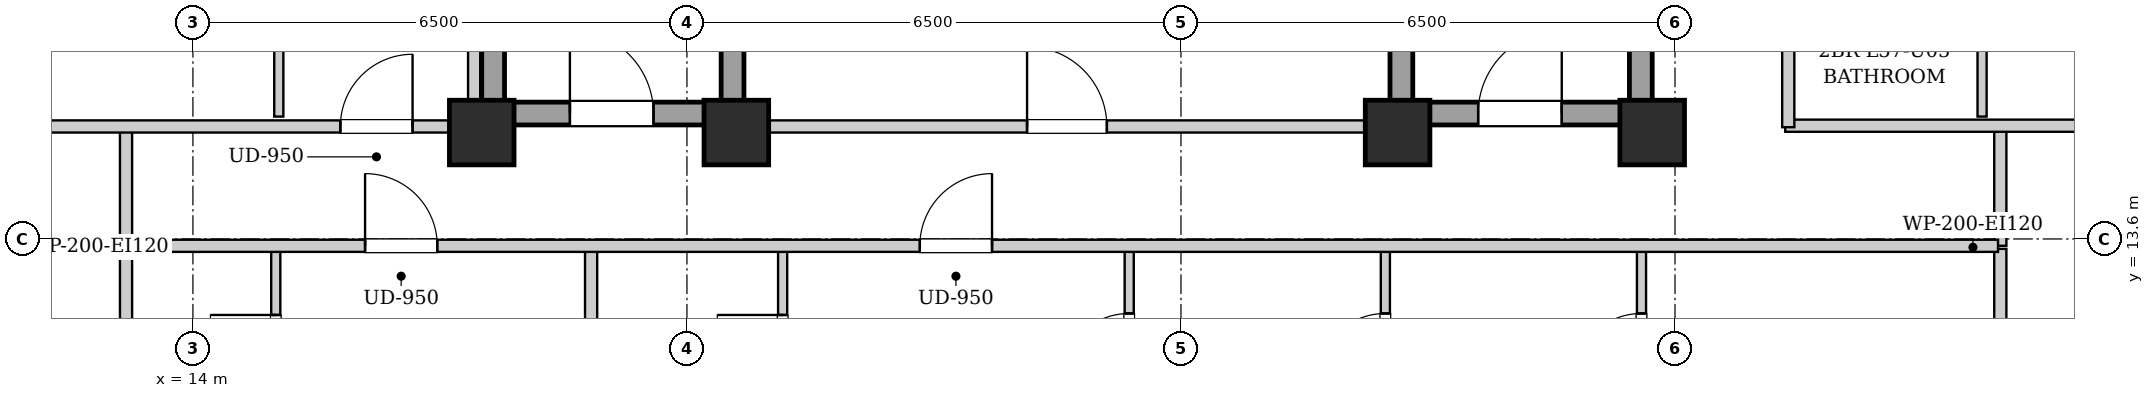
"""IFC4 building model, lengths in metres.
Left out: names, types, materials, properties, quantities, classifications, styles, units other than length and angle.
Written with IfcOpenShell. Run it as: python <this file> out.ifc"""

import sys

from ifc_helpers import new_model, si_unit, direction, frame, frame_2d, origin, origin_2d, place, context, subcontext, project, spatial, rectangle, extrude, element, fill, save


model = new_model("IFC4")
c1 = context("Model", 3, precision=1e-05, world=origin(), true_north=direction((0.0, 1.0)))
c2 = subcontext(c1, "Body", "Model", "MODEL_VIEW")
j1 = project(units=[si_unit("LENGTHUNIT", "METRE"), si_unit("PLANEANGLEUNIT", "RADIAN")], contexts=[c1])
p1 = place(None, origin())
s1 = spatial("IfcSite", under=j1, at=p1, CompositionType="ELEMENT")
p2 = place(p1, origin())
s2 = spatial("IfcBuilding", under=s1, at=p2, CompositionType="ELEMENT")
p3 = place(p2, frame((0.0, 0.0, 197.5)))
s3 = spatial("IfcBuildingStorey", under=s2, at=p3, CompositionType="ELEMENT", Elevation=197.5)
for number, where, z_axis, x_axis in (
    (1, (17.8, 15.0, 0.0), (0.0, 0.0, 1.0), (1.0, 0.0, 0.0)),
    (2, (21.15, 15.0, 0.0), (0.0, 0.0, 1.0), (1.0, 0.0, 0.0)),
    (3, (29.85, 15.0, 0.0), (0.0, 0.0, 1.0), (1.0, 0.0, 0.0)),
    (4, (33.2, 15.0, 0.0), (0.0, 0.0, 1.0), (1.0, 0.0, 0.0)),
):
    element("IfcColumn", number, at=place(p3, frame(where, z_axis=z_axis, x_axis=x_axis)), inside=s3, PredefinedType="COLUMN", context=c2, shape_type="SweptSolid", body=[
        extrude(rectangle(XDim=0.85, YDim=0.85, at=origin_2d()), origin(), (0.0, 0.0, 1.0), 3.3),
    ])
for number, where, z_axis, x_axis in (
    (5, (17.95, 15.1, 0.0), (0.0, 0.0, 1.0), (0.0, 1.0, 0.0)),
    (6, (21.1, 15.1, 0.0), (0.0, 0.0, 1.0), (0.0, 1.0, 0.0)),
):
    element("IfcWall", number, at=place(p3, frame(where, z_axis=z_axis, x_axis=x_axis)), inside=s3, PredefinedType="SHEAR", context=c2, shape_type="SweptSolid", body=[
        extrude(rectangle(XDim=9.0, YDim=0.3, at=frame_2d((4.5, 0.0))), origin(), (0.0, 0.0, 1.0), 3.04),
    ])
p4 = place(p3, frame((18.1, 15.25, 0.0), z_axis=(0.0, 0.0, 1.0), x_axis=(1.0, 0.0, 0.0)))
e7 = element("IfcWall", 7, at=p4, inside=s3, PredefinedType="SHEAR", context=c2, shape_type="SweptSolid", body=[
    extrude(rectangle(XDim=2.85, YDim=0.3, at=frame_2d((1.425, 0.0))), origin(), (0.0, 0.0, 1.0), 3.04),
])
p5 = place(p4, frame((0.86, 0.0, 0.0)))
e8 = element("IfcOpeningElement", 8, at=p5, cuts=e7, PredefinedType="OPENING", context=c2, shape_type="SweptSolid", body=[
    extrude(rectangle(XDim=1.1, YDim=2.05, at=frame_2d((0.55, 1.025))), frame((0.0, 0.16, 0.0), z_axis=(0.0, -1.0, 0.0), x_axis=(1.0, 0.0, 0.0)), (0.0, 0.0, 1.0), 0.32),
])
for number, where, z_axis, x_axis in (
    (9, (29.9, 15.1, 0.0), (0.0, 0.0, 1.0), (0.0, 1.0, 0.0)),
    (10, (33.05, 15.1, 0.0), (0.0, 0.0, 1.0), (0.0, 1.0, 0.0)),
):
    element("IfcWall", number, at=place(p3, frame(where, z_axis=z_axis, x_axis=x_axis)), inside=s3, PredefinedType="SHEAR", context=c2, shape_type="SweptSolid", body=[
        extrude(rectangle(XDim=9.0, YDim=0.3, at=frame_2d((4.5, 0.0))), origin(), (0.0, 0.0, 1.0), 3.04),
    ])
p6 = place(p3, frame((30.05, 15.25, 0.0), z_axis=(0.0, 0.0, 1.0), x_axis=(1.0, 0.0, 0.0)))
e11 = element("IfcWall", 11, at=p6, inside=s3, PredefinedType="SHEAR", context=c2, shape_type="SweptSolid", body=[
    extrude(rectangle(XDim=2.85, YDim=0.3, at=frame_2d((1.425, 0.0))), origin(), (0.0, 0.0, 1.0), 3.04),
])
p7 = place(p6, frame((0.86, 0.0, 0.0)))
e12 = element("IfcOpeningElement", 12, at=p7, cuts=e11, PredefinedType="OPENING", context=c2, shape_type="SweptSolid", body=[
    extrude(rectangle(XDim=1.1, YDim=2.05, at=frame_2d((0.55, 1.025))), frame((0.0, 0.16, 0.0), z_axis=(0.0, -1.0, 0.0), x_axis=(1.0, 0.0, 0.0)), (0.0, 0.0, 1.0), 0.32),
])
p8 = place(p3, frame((21.25, 15.08, 0.0), z_axis=(0.0, 0.0, 1.0), x_axis=(1.0, 0.0, 0.0)))
e13 = element("IfcWall", 13, at=p8, inside=s3, PredefinedType="PARTITIONING", context=c2, shape_type="SweptSolid", body=[
    extrude(rectangle(XDim=8.5, YDim=0.16, at=frame_2d((4.25, 0.0))), origin(), (0.0, 0.0, 1.0), 2.556),
])
p9 = place(p8, frame((3.725, 0.0, 0.0)))
e14 = element("IfcOpeningElement", 14, at=p9, cuts=e13, PredefinedType="OPENING", context=c2, shape_type="SweptSolid", body=[
    extrude(rectangle(XDim=1.05, YDim=2.05, at=frame_2d((0.525, 1.025))), frame((0.0, 0.09, 0.0), z_axis=(0.0, -1.0, 0.0), x_axis=(1.0, 0.0, 0.0)), (0.0, 0.0, 1.0), 0.18),
])
for number, where, z_axis, x_axis in (
    (15, (13.12, 13.51, 0.0), (0.0, 0.0, 1.0), (0.0, 1.0, 0.0)),
    (16, (37.78, 13.51, 0.0), (0.0, 0.0, 1.0), (0.0, 1.0, 0.0)),
):
    element("IfcWall", number, at=place(p3, frame(where, z_axis=z_axis, x_axis=x_axis)), inside=s3, PredefinedType="PARTITIONING", context=c2, shape_type="SweptSolid", body=[
        extrude(rectangle(XDim=1.58, YDim=0.16, at=frame_2d((0.79, 0.0))), origin(), (0.0, 0.0, 1.0), 3.04),
    ])
p10 = place(p3, frame((34.95, 15.09, 0.0), z_axis=(0.0, 0.0, 1.0), x_axis=(1.0, 0.0, 0.0)))
e17 = element("IfcWall", 17, at=p10, inside=s3, PredefinedType="PARTITIONING", context=c2, shape_type="SweptSolid", body=[
    extrude(rectangle(XDim=5.07, YDim=0.16, at=frame_2d((2.535, 0.0))), origin(), (0.0, 0.0, 1.0), 2.556),
])
p11 = place(p3, frame((13.12, 10.81, 0.0), z_axis=(0.0, 0.0, 1.0), x_axis=(0.0, 1.0, 0.0)))
e18 = element("IfcWall", 18, at=p11, inside=s3, PredefinedType="PARTITIONING", context=c2, shape_type="SweptSolid", body=[
    extrude(rectangle(XDim=2.66, YDim=0.16, at=frame_2d((1.33, 0.0))), origin(), (0.0, 0.0, 1.0), 3.04),
])
p12 = place(p3, frame((15.09, 10.87, 0.0), z_axis=(0.0, 0.0, 1.0), x_axis=(0.0, 1.0, 0.0)))
e19 = element("IfcWall", 19, at=p12, inside=s3, PredefinedType="PARTITIONING", context=c2, shape_type="SweptSolid", body=[
    extrude(rectangle(XDim=2.6, YDim=0.12, at=frame_2d((1.3, 0.0))), origin(), (0.0, 0.0, 1.0), 3.04),
])
p13 = place(p12, frame((0.87, 0.0, 0.0)))
e20 = element("IfcOpeningElement", 20, at=p13, cuts=e19, PredefinedType="OPENING", context=c2, shape_type="SweptSolid", body=[
    extrude(rectangle(XDim=0.86, YDim=2.05, at=frame_2d((0.43, 1.025))), frame((0.0, 0.07, 0.0), z_axis=(0.0, -1.0, 0.0), x_axis=(1.0, 0.0, 0.0)), (0.0, 0.0, 1.0), 0.14),
])
p14 = place(p3, frame((37.78, 10.81, 0.0), z_axis=(0.0, 0.0, 1.0), x_axis=(0.0, 1.0, 0.0)))
e21 = element("IfcWall", 21, at=p14, inside=s3, PredefinedType="PARTITIONING", context=c2, shape_type="SweptSolid", body=[
    extrude(rectangle(XDim=2.66, YDim=0.16, at=frame_2d((1.33, 0.0))), origin(), (0.0, 0.0, 1.0), 3.04),
])
p15 = place(p3, frame((19.239, 6.06, 0.0), z_axis=(0.0, 0.0, 1.0), x_axis=(0.0, 1.0, 0.0)))
e22 = element("IfcWall", 22, at=p15, inside=s3, PredefinedType="PARTITIONING", context=c2, shape_type="SweptSolid", body=[
    extrude(rectangle(XDim=7.41, YDim=0.16, at=frame_2d((3.705, 0.0))), origin(), (0.0, 0.0, 1.0), 3.04),
])
p16 = place(p3, frame((21.759, 10.87, 0.0), z_axis=(0.0, 0.0, 1.0), x_axis=(0.0, 1.0, 0.0)))
e23 = element("IfcWall", 23, at=p16, inside=s3, PredefinedType="PARTITIONING", context=c2, shape_type="SweptSolid", body=[
    extrude(rectangle(XDim=2.6, YDim=0.12, at=frame_2d((1.3, 0.0))), origin(), (0.0, 0.0, 1.0), 3.04),
])
p17 = place(p16, frame((0.87, 0.0, 0.0)))
e24 = element("IfcOpeningElement", 24, at=p17, cuts=e23, PredefinedType="OPENING", context=c2, shape_type="SweptSolid", body=[
    extrude(rectangle(XDim=0.86, YDim=2.05, at=frame_2d((0.43, 1.025))), frame((0.0, 0.07, 0.0), z_axis=(0.0, -1.0, 0.0), x_axis=(1.0, 0.0, 0.0)), (0.0, 0.0, 1.0), 0.14),
])
p18 = place(p3, frame((26.319, 10.87, 0.0), z_axis=(0.0, 0.0, 1.0), x_axis=(0.0, 1.0, 0.0)))
e25 = element("IfcWall", 25, at=p18, inside=s3, PredefinedType="PARTITIONING", context=c2, shape_type="SweptSolid", body=[
    extrude(rectangle(XDim=2.6, YDim=0.12, at=frame_2d((1.3, 0.0))), origin(), (0.0, 0.0, 1.0), 3.04),
])
p19 = place(p18, frame((0.85, 0.0, 0.0)))
e26 = element("IfcOpeningElement", 26, at=p19, cuts=e25, PredefinedType="OPENING", context=c2, shape_type="SweptSolid", body=[
    extrude(rectangle(XDim=0.9, YDim=2.05, at=frame_2d((0.45, 1.025))), frame((0.0, 0.07, 0.0), z_axis=(0.0, -1.0, 0.0), x_axis=(1.0, 0.0, 0.0)), (0.0, 0.0, 1.0), 0.14),
])
p20 = place(p3, frame((29.689, 10.87, 0.0), z_axis=(0.0, 0.0, 1.0), x_axis=(0.0, 1.0, 0.0)))
e27 = element("IfcWall", 27, at=p20, inside=s3, PredefinedType="PARTITIONING", context=c2, shape_type="SweptSolid", body=[
    extrude(rectangle(XDim=2.6, YDim=0.12, at=frame_2d((1.3, 0.0))), origin(), (0.0, 0.0, 1.0), 3.04),
])
p21 = place(p20, frame((0.85, 0.0, 0.0)))
e28 = element("IfcOpeningElement", 28, at=p21, cuts=e27, PredefinedType="OPENING", context=c2, shape_type="SweptSolid", body=[
    extrude(rectangle(XDim=0.9, YDim=2.05, at=frame_2d((0.45, 1.025))), frame((0.0, 0.07, 0.0), z_axis=(0.0, -1.0, 0.0), x_axis=(1.0, 0.0, 0.0)), (0.0, 0.0, 1.0), 0.14),
])
p22 = place(p3, frame((33.059, 10.87, 0.0), z_axis=(0.0, 0.0, 1.0), x_axis=(0.0, 1.0, 0.0)))
e29 = element("IfcWall", 29, at=p22, inside=s3, PredefinedType="PARTITIONING", context=c2, shape_type="SweptSolid", body=[
    extrude(rectangle(XDim=2.6, YDim=0.12, at=frame_2d((1.3, 0.0))), origin(), (0.0, 0.0, 1.0), 3.04),
])
p23 = place(p22, frame((0.85, 0.0, 0.0)))
e30 = element("IfcOpeningElement", 30, at=p23, cuts=e29, PredefinedType="OPENING", context=c2, shape_type="SweptSolid", body=[
    extrude(rectangle(XDim=0.9, YDim=2.05, at=frame_2d((0.45, 1.025))), frame((0.0, 0.07, 0.0), z_axis=(0.0, -1.0, 0.0), x_axis=(1.0, 0.0, 0.0)), (0.0, 0.0, 1.0), 0.14),
])
p24 = place(p3, frame((10.88, 15.08, 0.0), z_axis=(0.0, 0.0, 1.0), x_axis=(1.0, 0.0, 0.0)))
e31 = element("IfcWall", 31, at=p24, inside=s3, PredefinedType="PARTITIONING", context=c2, shape_type="SweptSolid", body=[
    extrude(rectangle(XDim=6.88, YDim=0.16, at=frame_2d((3.44, 0.0))), origin(), (0.0, 0.0, 1.0), 2.556),
])
p25 = place(p24, frame((5.06, 0.0, 0.0)))
e32 = element("IfcOpeningElement", 32, at=p25, cuts=e31, PredefinedType="OPENING", context=c2, shape_type="SweptSolid", body=[
    extrude(rectangle(XDim=0.95, YDim=2.1, at=frame_2d((0.475, 1.05))), frame((0.0, 0.09, 0.0), z_axis=(0.0, -1.0, 0.0), x_axis=(1.0, 0.0, 0.0)), (0.0, 0.0, 1.0), 0.18),
])
p26 = place(p3, frame((15.13, 15.21, 0.0), z_axis=(0.0, 0.0, 1.0), x_axis=(0.0, 1.0, 0.0)))
e33 = element("IfcWall", 33, at=p26, inside=s3, PredefinedType="PARTITIONING", context=c2, shape_type="SweptSolid", body=[
    extrude(rectangle(XDim=4.308, YDim=0.12, at=frame_2d((2.154, 0.0))), origin(), (0.0, 0.0, 1.0), 3.04),
])
p27 = place(p26, frame((1.704, 0.0, 0.0)))
e34 = element("IfcOpeningElement", 34, at=p27, cuts=e33, PredefinedType="OPENING", context=c2, shape_type="SweptSolid", body=[
    extrude(rectangle(XDim=0.9, YDim=2.05, at=frame_2d((0.45, 1.025))), frame((0.0, 0.07, 0.0), z_axis=(0.0, -1.0, 0.0), x_axis=(1.0, 0.0, 0.0)), (0.0, 0.0, 1.0), 0.14),
])
p28 = place(p3, frame((37.54, 15.21, 0.0), z_axis=(0.0, 0.0, 1.0), x_axis=(0.0, 1.0, 0.0)))
e35 = element("IfcWall", 35, at=p28, inside=s3, PredefinedType="PARTITIONING", context=c2, shape_type="SweptSolid", body=[
    extrude(rectangle(XDim=2.3, YDim=0.12, at=frame_2d((1.15, 0.0))), origin(), (0.0, 0.0, 1.0), 3.04),
])
p29 = place(p3, frame((13.15, 13.51, 0.0), z_axis=(0.0, 0.0, 1.0), x_axis=(1.0, 0.0, 0.0)))
e36 = element("IfcWall", 36, at=p29, inside=s3, PredefinedType="PARTITIONING", context=c2, shape_type="SweptSolid", body=[
    extrude(rectangle(XDim=24.6, YDim=0.16, at=frame_2d((12.3, 0.0))), origin(), (0.0, 0.0, 1.0), 3.04),
])
p30 = place(p29, frame((3.115, 0.0, 0.0)))
e37 = element("IfcOpeningElement", 37, at=p30, cuts=e36, PredefinedType="OPENING", context=c2, shape_type="SweptSolid", body=[
    extrude(rectangle(XDim=0.95, YDim=2.1, at=frame_2d((0.475, 1.05))), frame((0.0, 0.09, 0.0), z_axis=(0.0, -1.0, 0.0), x_axis=(1.0, 0.0, 0.0)), (0.0, 0.0, 1.0), 0.18),
])
p31 = place(p29, frame((10.414, 0.0, 0.0)))
e38 = element("IfcOpeningElement", 38, at=p31, cuts=e36, PredefinedType="OPENING", context=c2, shape_type="SweptSolid", body=[
    extrude(rectangle(XDim=0.95, YDim=2.1, at=frame_2d((0.475, 1.05))), frame((0.0, 0.09, 0.0), z_axis=(0.0, -1.0, 0.0), x_axis=(1.0, 0.0, 0.0)), (0.0, 0.0, 1.0), 0.18),
])
p32 = place(p3, frame((17.7, 15.02, 0.0), z_axis=(0.0, 0.0, 1.0), x_axis=(0.0, 1.0, 0.0)))
e39 = element("IfcWall", 39, at=p32, inside=s3, PredefinedType="PARTITIONING", context=c2, shape_type="SweptSolid", body=[
    extrude(rectangle(XDim=13.98, YDim=0.16, at=frame_2d((6.99, 0.0))), origin(), (0.0, 0.0, 1.0), 2.375),
])
p33 = place(p3, frame((34.99, 15.07, 0.0), z_axis=(0.0, 0.0, 1.0), x_axis=(0.0, 1.0, 0.0)))
e40 = element("IfcWall", 40, at=p33, inside=s3, PredefinedType="PARTITIONING", context=c2, shape_type="SweptSolid", body=[
    extrude(rectangle(XDim=13.93, YDim=0.16, at=frame_2d((6.965, 0.0))), origin(), (0.0, 0.0, 1.0), 3.04),
])
p34 = place(p33, frame((4.385, 0.0, 0.0)))
e41 = element("IfcOpeningElement", 41, at=p34, cuts=e40, PredefinedType="OPENING", context=c2, shape_type="SweptSolid", body=[
    extrude(rectangle(XDim=0.95, YDim=2.1, at=frame_2d((0.475, 1.05))), frame((0.0, 0.09, 0.0), z_axis=(0.0, -1.0, 0.0), x_axis=(1.0, 0.0, 0.0)), (0.0, 0.0, 1.0), 0.18),
])
p35 = place(p5, origin())
e42 = element("IfcDoor", 42, at=p35, inside=s3, OperationType="SINGLE_SWING_LEFT", PredefinedType="DOOR", context=c2, shape_type="SweptSolid", body=[
    extrude(rectangle(XDim=1.1, YDim=2.05, at=frame_2d((0.55, 1.025))), frame((0.0, 0.025, 0.0), z_axis=(0.0, -1.0, 0.0), x_axis=(1.0, 0.0, 0.0)), (0.0, 0.0, 1.0), 0.05),
])
fill(e8, e42)
p36 = place(p7, origin())
e43 = element("IfcDoor", 43, at=p36, inside=s3, OperationType="SINGLE_SWING_RIGHT", PredefinedType="DOOR", context=c2, shape_type="SweptSolid", body=[
    extrude(rectangle(XDim=1.1, YDim=2.05, at=frame_2d((0.55, 1.025))), frame((0.0, 0.025, 0.0), z_axis=(0.0, -1.0, 0.0), x_axis=(1.0, 0.0, 0.0)), (0.0, 0.0, 1.0), 0.05),
])
fill(e12, e43)
p37 = place(p9, origin())
e44 = element("IfcDoor", 44, at=p37, inside=s3, OperationType="SINGLE_SWING_LEFT", PredefinedType="DOOR", context=c2, shape_type="SweptSolid", body=[
    extrude(rectangle(XDim=1.05, YDim=2.05, at=frame_2d((0.525, 1.025))), frame((0.0, 0.025, 0.0), z_axis=(0.0, -1.0, 0.0), x_axis=(1.0, 0.0, 0.0)), (0.0, 0.0, 1.0), 0.05),
])
fill(e14, e44)
p38 = place(p13, origin())
e45 = element("IfcDoor", 45, at=p38, inside=s3, OperationType="SINGLE_SWING_RIGHT", PredefinedType="DOOR", context=c2, shape_type="SweptSolid", body=[
    extrude(rectangle(XDim=0.86, YDim=2.05, at=frame_2d((0.43, 1.025))), frame((0.0, 0.025, 0.0), z_axis=(0.0, -1.0, 0.0), x_axis=(1.0, 0.0, 0.0)), (0.0, 0.0, 1.0), 0.05),
])
fill(e20, e45)
p39 = place(p17, origin())
e46 = element("IfcDoor", 46, at=p39, inside=s3, OperationType="SINGLE_SWING_RIGHT", PredefinedType="DOOR", context=c2, shape_type="SweptSolid", body=[
    extrude(rectangle(XDim=0.86, YDim=2.05, at=frame_2d((0.43, 1.025))), frame((0.0, 0.025, 0.0), z_axis=(0.0, -1.0, 0.0), x_axis=(1.0, 0.0, 0.0)), (0.0, 0.0, 1.0), 0.05),
])
fill(e24, e46)
p40 = place(p19, origin())
e47 = element("IfcDoor", 47, at=p40, inside=s3, OperationType="SINGLE_SWING_LEFT", PredefinedType="DOOR", context=c2, shape_type="SweptSolid", body=[
    extrude(rectangle(XDim=0.9, YDim=2.05, at=frame_2d((0.45, 1.025))), frame((0.0, 0.025, 0.0), z_axis=(0.0, -1.0, 0.0), x_axis=(1.0, 0.0, 0.0)), (0.0, 0.0, 1.0), 0.05),
])
fill(e26, e47)
p41 = place(p21, origin())
e48 = element("IfcDoor", 48, at=p41, inside=s3, OperationType="SINGLE_SWING_LEFT", PredefinedType="DOOR", context=c2, shape_type="SweptSolid", body=[
    extrude(rectangle(XDim=0.9, YDim=2.05, at=frame_2d((0.45, 1.025))), frame((0.0, 0.025, 0.0), z_axis=(0.0, -1.0, 0.0), x_axis=(1.0, 0.0, 0.0)), (0.0, 0.0, 1.0), 0.05),
])
fill(e28, e48)
p42 = place(p23, origin())
e49 = element("IfcDoor", 49, at=p42, inside=s3, OperationType="SINGLE_SWING_LEFT", PredefinedType="DOOR", context=c2, shape_type="SweptSolid", body=[
    extrude(rectangle(XDim=0.9, YDim=2.05, at=frame_2d((0.45, 1.025))), frame((0.0, 0.025, 0.0), z_axis=(0.0, -1.0, 0.0), x_axis=(1.0, 0.0, 0.0)), (0.0, 0.0, 1.0), 0.05),
])
fill(e30, e49)
p43 = place(p25, origin())
e50 = element("IfcDoor", 50, at=p43, inside=s3, OperationType="SINGLE_SWING_RIGHT", PredefinedType="DOOR", context=c2, shape_type="SweptSolid", body=[
    extrude(rectangle(XDim=0.95, YDim=2.1, at=frame_2d((0.475, 1.05))), frame((0.0, 0.025, 0.0), z_axis=(0.0, -1.0, 0.0), x_axis=(1.0, 0.0, 0.0)), (0.0, 0.0, 1.0), 0.05),
])
fill(e32, e50)
p44 = place(p30, origin())
e51 = element("IfcDoor", 51, at=p44, inside=s3, OperationType="SINGLE_SWING_LEFT", PredefinedType="DOOR", context=c2, shape_type="SweptSolid", body=[
    extrude(rectangle(XDim=0.95, YDim=2.1, at=frame_2d((0.475, 1.05))), frame((0.0, 0.025, 0.0), z_axis=(0.0, -1.0, 0.0), x_axis=(1.0, 0.0, 0.0)), (0.0, 0.0, 1.0), 0.05),
])
fill(e37, e51)
p45 = place(p31, origin())
e52 = element("IfcDoor", 52, at=p45, inside=s3, OperationType="SINGLE_SWING_RIGHT", PredefinedType="DOOR", context=c2, shape_type="SweptSolid", body=[
    extrude(rectangle(XDim=0.95, YDim=2.1, at=frame_2d((0.475, 1.05))), frame((0.0, 0.025, 0.0), z_axis=(0.0, -1.0, 0.0), x_axis=(1.0, 0.0, 0.0)), (0.0, 0.0, 1.0), 0.05),
])
fill(e38, e52)
save(model, sys.argv[1])
